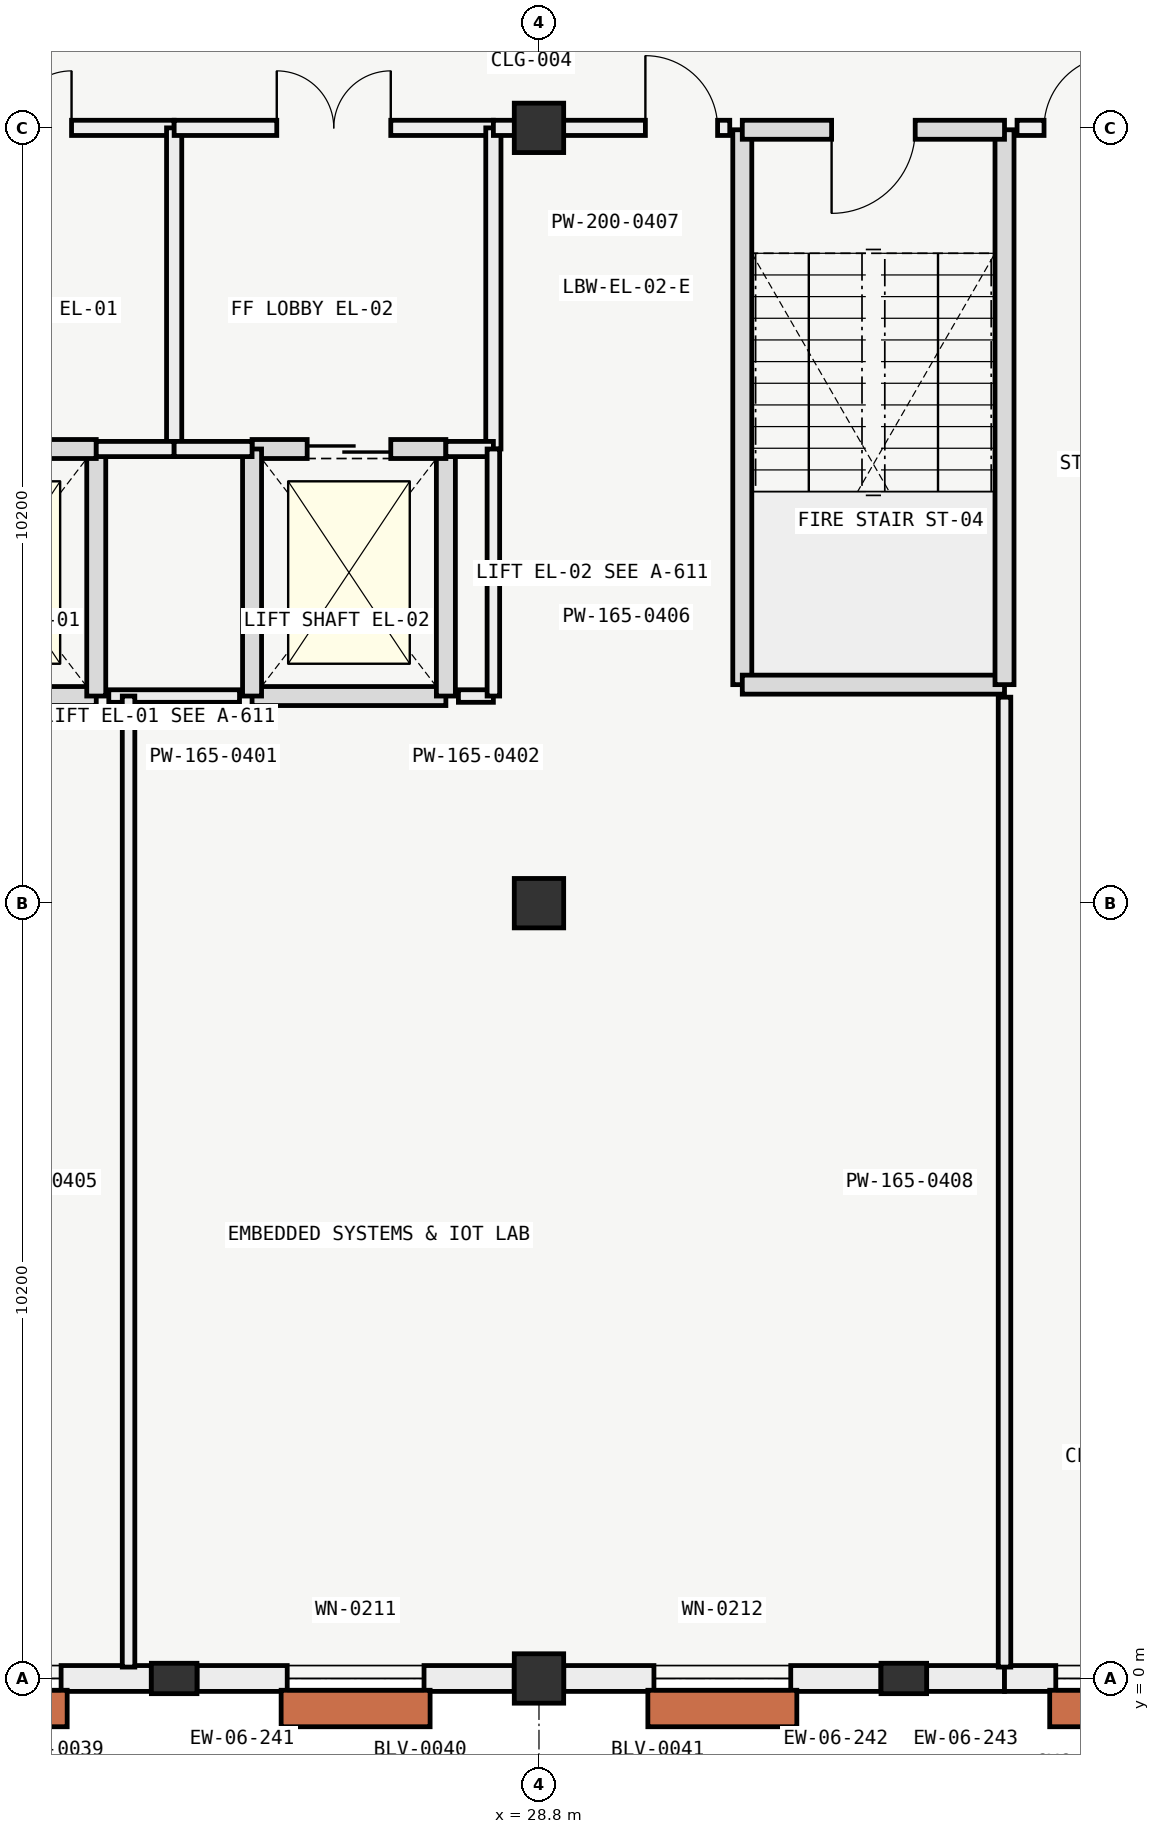
"""IFC4 building model, lengths in metres.
Left out: names, types, materials, properties, quantities, classifications, styles, units other than length and angle.
Written with IfcOpenShell. Run it as: python <this file> out.ifc"""

import sys

from ifc_helpers import new_model, si_unit, direction, frame, frame_2d, origin, origin_2d, place, context, subcontext, project, spatial, rectangle, extrude, element, fill, save


model = new_model("IFC4")
c1 = context("Model", 3, precision=1e-05, world=origin(), true_north=direction((0.0, 1.0)))
c2 = subcontext(c1, "Body", "Model", "MODEL_VIEW")
j1 = project(units=[si_unit("LENGTHUNIT", "METRE"), si_unit("PLANEANGLEUNIT", "RADIAN")], contexts=[c1])
p1 = place(None, origin())
s1 = spatial("IfcSite", under=j1, at=p1, CompositionType="ELEMENT")
p2 = place(p1, origin())
s2 = spatial("IfcBuilding", under=s1, at=p2, CompositionType="ELEMENT")
p3 = place(p2, frame((0.0, 0.0, 13.8)))
s3 = spatial("IfcBuildingStorey", under=s2, at=p3, CompositionType="ELEMENT", Elevation=13.8)
for number, where, z_axis, x_axis in (
    (1, (28.8, 0.0, 0.0), (0.0, 0.0, 1.0), (1.0, 0.0, 0.0)),
    (2, (28.8, 10.2, 0.0), (0.0, 0.0, 1.0), (1.0, 0.0, 0.0)),
    (3, (28.8, 20.4, 0.0), (0.0, 0.0, 1.0), (1.0, 0.0, 0.0)),
):
    element("IfcColumn", number, at=place(p3, frame(where, z_axis=z_axis, x_axis=x_axis)), inside=s3, PredefinedType="COLUMN", context=c2, shape_type="SweptSolid", body=[
        extrude(rectangle(XDim=0.65, YDim=0.65, at=origin_2d()), origin(), (0.0, 0.0, 1.0), 4.2),
    ])
for number, where, z_axis, x_axis in (
    (4, (24.0, 0.0, 0.0), (0.0, 0.0, 1.0), (0.0, 1.0, 0.0)),
    (5, (33.6, 0.0, 0.0), (0.0, 0.0, 1.0), (0.0, 1.0, 0.0)),
):
    element("IfcColumn", number, at=place(p3, frame(where, z_axis=z_axis, x_axis=x_axis)), inside=s3, PredefinedType="PILASTER", context=c2, shape_type="SweptSolid", body=[
        extrude(rectangle(XDim=0.4, YDim=0.6, at=origin_2d()), origin(), (0.0, 0.0, 1.0), 4.2),
    ])
p4 = place(p3, frame((23.699, 0.0, 0.0), z_axis=(0.0, 0.0, 1.0), x_axis=(-1.0, 0.0, 0.0)))
e6 = element("IfcWall", 6, at=p4, inside=s3, PredefinedType="SOLIDWALL", context=c2, shape_type="SweptSolid", body=[
    extrude(rectangle(XDim=4.173, YDim=0.34, at=frame_2d((2.086, 0.0))), origin(), (0.0, 0.0, 1.0), 3.28),
])
p5 = place(p4, frame((1.187, 0.0, 0.8)))
e7 = element("IfcOpeningElement", 7, at=p5, cuts=e6, PredefinedType="OPENING", context=c2, shape_type="SweptSolid", body=[
    extrude(rectangle(XDim=1.8, YDim=2.1, at=frame_2d((0.9, 1.05))), frame((0.0, 0.18, 0.0), z_axis=(0.0, -1.0, 0.0), x_axis=(1.0, 0.0, 0.0)), (0.0, 0.0, 1.0), 0.36),
])
p6 = place(p3, frame((28.474, 0.0, 0.0), z_axis=(0.0, 0.0, 1.0), x_axis=(-1.0, 0.0, 0.0)))
e8 = element("IfcWall", 8, at=p6, inside=s3, PredefinedType="SOLIDWALL", context=c2, shape_type="SweptSolid", body=[
    extrude(rectangle(XDim=4.173, YDim=0.34, at=frame_2d((2.086, 0.0))), origin(), (0.0, 0.0, 1.0), 3.28),
])
p7 = place(p6, frame((1.187, 0.0, 0.8)))
e9 = element("IfcOpeningElement", 9, at=p7, cuts=e8, PredefinedType="OPENING", context=c2, shape_type="SweptSolid", body=[
    extrude(rectangle(XDim=1.8, YDim=2.1, at=frame_2d((0.9, 1.05))), frame((0.0, 0.18, 0.0), z_axis=(0.0, -1.0, 0.0), x_axis=(1.0, 0.0, 0.0)), (0.0, 0.0, 1.0), 0.36),
])
p8 = place(p3, frame((33.299, 0.0, 0.0), z_axis=(0.0, 0.0, 1.0), x_axis=(-1.0, 0.0, 0.0)))
e10 = element("IfcWall", 10, at=p8, inside=s3, PredefinedType="SOLIDWALL", context=c2, shape_type="SweptSolid", body=[
    extrude(rectangle(XDim=4.173, YDim=0.34, at=frame_2d((2.086, 0.0))), origin(), (0.0, 0.0, 1.0), 3.28),
])
p9 = place(p8, frame((1.187, 0.0, 0.8)))
e11 = element("IfcOpeningElement", 11, at=p9, cuts=e10, PredefinedType="OPENING", context=c2, shape_type="SweptSolid", body=[
    extrude(rectangle(XDim=1.8, YDim=2.1, at=frame_2d((0.9, 1.05))), frame((0.0, 0.18, 0.0), z_axis=(0.0, -1.0, 0.0), x_axis=(1.0, 0.0, 0.0)), (0.0, 0.0, 1.0), 0.36),
])
p10 = place(p3, frame((34.925, 0.0, 0.0), z_axis=(0.0, 0.0, 1.0), x_axis=(-1.0, 0.0, 0.0)))
e12 = element("IfcWall", 12, at=p10, inside=s3, PredefinedType="SOLIDWALL", context=c2, shape_type="SweptSolid", body=[
    extrude(rectangle(XDim=1.024, YDim=0.34, at=frame_2d((0.512, 0.0))), origin(), (0.0, 0.0, 1.0), 3.28),
])
p11 = place(p3, frame((38.074, 0.0, 0.0), z_axis=(0.0, 0.0, 1.0), x_axis=(-1.0, 0.0, 0.0)))
e13 = element("IfcWall", 13, at=p11, inside=s3, PredefinedType="SOLIDWALL", context=c2, shape_type="SweptSolid", body=[
    extrude(rectangle(XDim=3.149, YDim=0.34, at=frame_2d((1.574, 0.0))), origin(), (0.0, 0.0, 1.0), 3.28),
])
p12 = place(p11, frame((0.675, 0.0, 0.8)))
e14 = element("IfcOpeningElement", 14, at=p12, cuts=e13, PredefinedType="OPENING", context=c2, shape_type="SweptSolid", body=[
    extrude(rectangle(XDim=1.8, YDim=2.1, at=frame_2d((0.9, 1.05))), frame((0.0, 0.18, 0.0), z_axis=(0.0, -1.0, 0.0), x_axis=(1.0, 0.0, 0.0)), (0.0, 0.0, 1.0), 0.36),
])
p13 = place(p3, frame((31.475, 20.375, 0.0), z_axis=(0.0, 0.0, 1.0), x_axis=(0.0, -1.0, 0.0)))
e15 = element("IfcWall", 15, at=p13, inside=s3, PredefinedType="SOLIDWALL", context=c2, shape_type="SweptSolid", body=[
    extrude(rectangle(XDim=7.3, YDim=0.25, at=frame_2d((3.65, 0.0))), origin(), (0.0, 0.0, 1.0), 3.95),
])
p14 = place(p3, frame((31.475, 13.075, 0.0), z_axis=(0.0, 0.0, 1.0), x_axis=(1.0, 0.0, 0.0)))
e16 = element("IfcWall", 16, at=p14, inside=s3, PredefinedType="SOLIDWALL", context=c2, shape_type="SweptSolid", body=[
    extrude(rectangle(XDim=3.45, YDim=0.25, at=frame_2d((1.725, 0.0))), origin(), (0.0, 0.0, 1.0), 3.95),
])
p15 = place(p3, frame((34.925, 13.075, 0.0), z_axis=(0.0, 0.0, 1.0), x_axis=(0.0, 1.0, 0.0)))
e17 = element("IfcWall", 17, at=p15, inside=s3, PredefinedType="SOLIDWALL", context=c2, shape_type="SweptSolid", body=[
    extrude(rectangle(XDim=7.3, YDim=0.25, at=frame_2d((3.65, 0.0))), origin(), (0.0, 0.0, 1.0), 3.95),
])
p16 = place(p3, frame((34.925, 20.375, 0.0), z_axis=(0.0, 0.0, 1.0), x_axis=(-1.0, 0.0, 0.0)))
e18 = element("IfcWall", 18, at=p16, inside=s3, PredefinedType="SOLIDWALL", context=c2, shape_type="SweptSolid", body=[
    extrude(rectangle(XDim=3.45, YDim=0.25, at=frame_2d((1.725, 0.0))), origin(), (0.0, 0.0, 1.0), 3.95),
])
p17 = place(p16, frame((1.175, 0.0, 0.0)))
e19 = element("IfcOpeningElement", 19, at=p17, cuts=e18, PredefinedType="OPENING", context=c2, shape_type="SweptSolid", body=[
    extrude(rectangle(XDim=1.1, YDim=2.2, at=frame_2d((0.55, 1.1))), frame((0.0, 0.135, 0.0), z_axis=(0.0, -1.0, 0.0), x_axis=(1.0, 0.0, 0.0)), (0.0, 0.0, 1.0), 0.27),
])
p18 = place(p3, frame((20.425, 12.925, 0.0), z_axis=(0.0, 0.0, 1.0), x_axis=(1.0, 0.0, 0.0)))
e20 = element("IfcWall", 20, at=p18, inside=s3, PredefinedType="SOLIDWALL", context=c2, shape_type="SweptSolid", body=[
    extrude(rectangle(XDim=2.55, YDim=0.25, at=frame_2d((1.275, 0.0))), origin(), (0.0, 0.0, 1.0), 3.95),
])
p19 = place(p3, frame((22.975, 12.925, 0.0), z_axis=(0.0, 0.0, 1.0), x_axis=(0.0, 1.0, 0.0)))
e21 = element("IfcWall", 21, at=p19, inside=s3, PredefinedType="SOLIDWALL", context=c2, shape_type="SweptSolid", body=[
    extrude(rectangle(XDim=3.25, YDim=0.25, at=frame_2d((1.625, 0.0))), origin(), (0.0, 0.0, 1.0), 3.95),
])
p20 = place(p3, frame((22.975, 16.175, 0.0), z_axis=(0.0, 0.0, 1.0), x_axis=(-1.0, 0.0, 0.0)))
e22 = element("IfcWall", 22, at=p20, inside=s3, PredefinedType="SOLIDWALL", context=c2, shape_type="SweptSolid", body=[
    extrude(rectangle(XDim=2.55, YDim=0.25, at=frame_2d((1.275, 0.0))), origin(), (0.0, 0.0, 1.0), 3.95),
])
p21 = place(p20, frame((0.725, 0.0, 0.0)))
e23 = element("IfcOpeningElement", 23, at=p21, cuts=e22, PredefinedType="OPENING", context=c2, shape_type="SweptSolid", body=[
    extrude(rectangle(XDim=1.1, YDim=2.1, at=frame_2d((0.55, 1.05))), frame((0.0, 0.135, 0.0), z_axis=(0.0, -1.0, 0.0), x_axis=(1.0, 0.0, 0.0)), (0.0, 0.0, 1.0), 0.27),
])
p22 = place(p3, frame((19.8, 20.4, 0.0), z_axis=(0.0, 0.0, 1.0), x_axis=(1.0, 0.0, 0.0)))
e24 = element("IfcWall", 24, at=p22, inside=s3, PredefinedType="PARTITIONING", context=c2, shape_type="SweptSolid", body=[
    extrude(rectangle(XDim=4.2, YDim=0.2, at=frame_2d((2.1, 0.0))), origin(), (0.0, 0.0, 1.0), 3.33),
])
p23 = place(p22, frame((1.35, 0.0, 0.0)))
e25 = element("IfcOpeningElement", 25, at=p23, cuts=e24, PredefinedType="OPENING", context=c2, shape_type="SweptSolid", body=[
    extrude(rectangle(XDim=1.5, YDim=2.2, at=frame_2d((0.75, 1.1))), frame((0.0, 0.11, 0.0), z_axis=(0.0, -1.0, 0.0), x_axis=(1.0, 0.0, 0.0)), (0.0, 0.0, 1.0), 0.22),
])
p24 = place(p3, frame((24.0, 16.175, 0.0), z_axis=(0.0, 0.0, 1.0), x_axis=(0.0, 1.0, 0.0)))
e26 = element("IfcWall", 26, at=p24, inside=s3, PredefinedType="PARTITIONING", context=c2, shape_type="SweptSolid", body=[
    extrude(rectangle(XDim=4.225, YDim=0.2, at=frame_2d((2.112, 0.0))), origin(), (0.0, 0.0, 1.0), 3.33),
])
p25 = place(p3, frame((22.975, 16.175, 0.0), z_axis=(0.0, 0.0, 1.0), x_axis=(1.0, 0.0, 0.0)))
e27 = element("IfcWall", 27, at=p25, inside=s3, PredefinedType="PARTITIONING", context=c2, shape_type="SweptSolid", body=[
    extrude(rectangle(XDim=1.025, YDim=0.2, at=frame_2d((0.512, 0.0))), origin(), (0.0, 0.0, 1.0), 3.55),
])
p26 = place(p3, frame((25.025, 12.925, 0.0), z_axis=(0.0, 0.0, 1.0), x_axis=(1.0, 0.0, 0.0)))
e28 = element("IfcWall", 28, at=p26, inside=s3, PredefinedType="SOLIDWALL", context=c2, shape_type="SweptSolid", body=[
    extrude(rectangle(XDim=2.55, YDim=0.25, at=frame_2d((1.275, 0.0))), origin(), (0.0, 0.0, 1.0), 3.95),
])
p27 = place(p3, frame((27.575, 12.925, 0.0), z_axis=(0.0, 0.0, 1.0), x_axis=(0.0, 1.0, 0.0)))
e29 = element("IfcWall", 29, at=p27, inside=s3, PredefinedType="SOLIDWALL", context=c2, shape_type="SweptSolid", body=[
    extrude(rectangle(XDim=3.25, YDim=0.25, at=frame_2d((1.625, 0.0))), origin(), (0.0, 0.0, 1.0), 3.95),
])
p28 = place(p3, frame((27.575, 16.175, 0.0), z_axis=(0.0, 0.0, 1.0), x_axis=(-1.0, 0.0, 0.0)))
e30 = element("IfcWall", 30, at=p28, inside=s3, PredefinedType="SOLIDWALL", context=c2, shape_type="SweptSolid", body=[
    extrude(rectangle(XDim=2.55, YDim=0.25, at=frame_2d((1.275, 0.0))), origin(), (0.0, 0.0, 1.0), 3.95),
])
p29 = place(p28, frame((0.725, 0.0, 0.0)))
e31 = element("IfcOpeningElement", 31, at=p29, cuts=e30, PredefinedType="OPENING", context=c2, shape_type="SweptSolid", body=[
    extrude(rectangle(XDim=1.1, YDim=2.1, at=frame_2d((0.55, 1.05))), frame((0.0, 0.135, 0.0), z_axis=(0.0, -1.0, 0.0), x_axis=(1.0, 0.0, 0.0)), (0.0, 0.0, 1.0), 0.27),
])
p30 = place(p3, frame((25.025, 16.175, 0.0), z_axis=(0.0, 0.0, 1.0), x_axis=(0.0, -1.0, 0.0)))
e32 = element("IfcWall", 32, at=p30, inside=s3, PredefinedType="SOLIDWALL", context=c2, shape_type="SweptSolid", body=[
    extrude(rectangle(XDim=3.25, YDim=0.25, at=frame_2d((1.625, 0.0))), origin(), (0.0, 0.0, 1.0), 3.95),
])
p31 = place(p3, frame((24.0, 20.4, 0.0), z_axis=(0.0, 0.0, 1.0), x_axis=(1.0, 0.0, 0.0)))
e33 = element("IfcWall", 33, at=p31, inside=s3, PredefinedType="PARTITIONING", context=c2, shape_type="SweptSolid", body=[
    extrude(rectangle(XDim=4.2, YDim=0.2, at=frame_2d((2.1, 0.0))), origin(), (0.0, 0.0, 1.0), 3.33),
])
p32 = place(p31, frame((1.35, 0.0, 0.0)))
e34 = element("IfcOpeningElement", 34, at=p32, cuts=e33, PredefinedType="OPENING", context=c2, shape_type="SweptSolid", body=[
    extrude(rectangle(XDim=1.5, YDim=2.2, at=frame_2d((0.75, 1.1))), frame((0.0, 0.11, 0.0), z_axis=(0.0, -1.0, 0.0), x_axis=(1.0, 0.0, 0.0)), (0.0, 0.0, 1.0), 0.22),
])
p33 = place(p3, frame((28.2, 16.175, 0.0), z_axis=(0.0, 0.0, 1.0), x_axis=(0.0, 1.0, 0.0)))
e35 = element("IfcWall", 35, at=p33, inside=s3, PredefinedType="PARTITIONING", context=c2, shape_type="SweptSolid", body=[
    extrude(rectangle(XDim=4.225, YDim=0.2, at=frame_2d((2.112, 0.0))), origin(), (0.0, 0.0, 1.0), 3.33),
])
p34 = place(p3, frame((24.0, 16.175, 0.0), z_axis=(0.0, 0.0, 1.0), x_axis=(1.0, 0.0, 0.0)))
e36 = element("IfcWall", 36, at=p34, inside=s3, PredefinedType="PARTITIONING", context=c2, shape_type="SweptSolid", body=[
    extrude(rectangle(XDim=1.025, YDim=0.2, at=frame_2d((0.512, 0.0))), origin(), (0.0, 0.0, 1.0), 3.55),
])
p35 = place(p3, frame((27.575, 16.175, 0.0), z_axis=(0.0, 0.0, 1.0), x_axis=(1.0, 0.0, 0.0)))
e37 = element("IfcWall", 37, at=p35, inside=s3, PredefinedType="PARTITIONING", context=c2, shape_type="SweptSolid", body=[
    extrude(rectangle(XDim=0.625, YDim=0.2, at=frame_2d((0.312, 0.0))), origin(), (0.0, 0.0, 1.0), 3.55),
])
p36 = place(p3, frame((23.14, 12.925, 0.0), z_axis=(0.0, 0.0, 1.0), x_axis=(1.0, 0.0, 0.0)))
e38 = element("IfcWall", 38, at=p36, inside=s3, PredefinedType="PARTITIONING", context=c2, shape_type="SweptSolid", body=[
    extrude(rectangle(XDim=1.72, YDim=0.165, at=frame_2d((0.86, 0.0))), origin(), (0.0, 0.0, 1.0), 3.85),
])
p37 = place(p3, frame((27.74, 12.925, 0.0), z_axis=(0.0, 0.0, 1.0), x_axis=(1.0, 0.0, 0.0)))
e39 = element("IfcWall", 39, at=p37, inside=s3, PredefinedType="PARTITIONING", context=c2, shape_type="SweptSolid", body=[
    extrude(rectangle(XDim=0.46, YDim=0.165, at=frame_2d((0.23, 0.0))), origin(), (0.0, 0.0, 1.0), 3.85),
])
p38 = place(p3, frame((23.4, 0.15, 0.0), z_axis=(0.0, 0.0, 1.0), x_axis=(0.0, 1.0, 0.0)))
e40 = element("IfcWall", 40, at=p38, inside=s3, PredefinedType="PARTITIONING", context=c2, shape_type="SweptSolid", body=[
    extrude(rectangle(XDim=12.775, YDim=0.165, at=frame_2d((6.388, 0.0))), origin(), (0.0, 0.0, 1.0), 3.33),
])
p39 = place(p3, frame((28.2, 12.925, 0.0), z_axis=(0.0, 0.0, 1.0), x_axis=(0.0, 1.0, 0.0)))
e41 = element("IfcWall", 41, at=p39, inside=s3, PredefinedType="PARTITIONING", context=c2, shape_type="SweptSolid", body=[
    extrude(rectangle(XDim=3.25, YDim=0.165, at=frame_2d((1.625, 0.0))), origin(), (0.0, 0.0, 1.0), 3.85),
])
p40 = place(p3, frame((28.2, 20.4, 0.0), z_axis=(0.0, 0.0, 1.0), x_axis=(1.0, 0.0, 0.0)))
e42 = element("IfcWall", 42, at=p40, inside=s3, PredefinedType="PARTITIONING", context=c2, shape_type="SweptSolid", body=[
    extrude(rectangle(XDim=3.11, YDim=0.2, at=frame_2d((1.555, 0.0))), origin(), (0.0, 0.0, 1.0), 3.28),
])
p41 = place(p40, frame((2.0, 0.0, 0.0)))
e43 = element("IfcOpeningElement", 43, at=p41, cuts=e42, PredefinedType="OPENING", context=c2, shape_type="SweptSolid", body=[
    extrude(rectangle(XDim=0.95, YDim=2.1, at=frame_2d((0.475, 1.05))), frame((0.0, 0.11, 0.0), z_axis=(0.0, -1.0, 0.0), x_axis=(1.0, 0.0, 0.0)), (0.0, 0.0, 1.0), 0.22),
])
p42 = place(p3, frame((34.925, 0.15, 0.0), z_axis=(0.0, 0.0, 1.0), x_axis=(0.0, 1.0, 0.0)))
e44 = element("IfcWall", 44, at=p42, inside=s3, PredefinedType="PARTITIONING", context=c2, shape_type="SweptSolid", body=[
    extrude(rectangle(XDim=12.76, YDim=0.165, at=frame_2d((6.38, 0.0))), origin(), (0.0, 0.0, 1.0), 3.33),
])
p43 = place(p3, frame((35.09, 20.4, 0.0), z_axis=(0.0, 0.0, 1.0), x_axis=(1.0, 0.0, 0.0)))
e45 = element("IfcWall", 45, at=p43, inside=s3, PredefinedType="PARTITIONING", context=c2, shape_type="SweptSolid", body=[
    extrude(rectangle(XDim=12.76, YDim=0.2, at=frame_2d((6.38, 0.0))), origin(), (0.0, 0.0, 1.0), 3.28),
])
p44 = place(p43, frame((0.355, 0.0, 0.0)))
e46 = element("IfcOpeningElement", 46, at=p44, cuts=e45, PredefinedType="OPENING", context=c2, shape_type="SweptSolid", body=[
    extrude(rectangle(XDim=0.95, YDim=2.1, at=frame_2d((0.475, 1.05))), frame((0.0, 0.11, 0.0), z_axis=(0.0, -1.0, 0.0), x_axis=(1.0, 0.0, 0.0)), (0.0, 0.0, 1.0), 0.22),
])
p45 = place(p43, frame((10.66, 0.0, 0.0)))
e47 = element("IfcOpeningElement", 47, at=p45, cuts=e45, PredefinedType="OPENING", context=c2, shape_type="SweptSolid", body=[
    extrude(rectangle(XDim=0.95, YDim=2.1, at=frame_2d((0.475, 1.05))), frame((0.0, 0.11, 0.0), z_axis=(0.0, -1.0, 0.0), x_axis=(1.0, 0.0, 0.0)), (0.0, 0.0, 1.0), 0.22),
])
p46 = place(p5, origin())
e48 = element("IfcWindow", 48, at=p46, inside=s3, PartitioningType="SINGLE_PANEL", PredefinedType="WINDOW", context=c2, shape_type="SweptSolid", body=[
    extrude(rectangle(XDim=1.8, YDim=2.1, at=frame_2d((0.9, 1.05))), frame((0.0, 0.03, 0.0), z_axis=(0.0, -1.0, 0.0), x_axis=(1.0, 0.0, 0.0)), (0.0, 0.0, 1.0), 0.06),
])
fill(e7, e48)
p47 = place(p7, origin())
e49 = element("IfcWindow", 49, at=p47, inside=s3, PartitioningType="SINGLE_PANEL", PredefinedType="WINDOW", context=c2, shape_type="SweptSolid", body=[
    extrude(rectangle(XDim=1.8, YDim=2.1, at=frame_2d((0.9, 1.05))), frame((0.0, 0.03, 0.0), z_axis=(0.0, -1.0, 0.0), x_axis=(1.0, 0.0, 0.0)), (0.0, 0.0, 1.0), 0.06),
])
fill(e9, e49)
p48 = place(p9, origin())
e50 = element("IfcWindow", 50, at=p48, inside=s3, PartitioningType="SINGLE_PANEL", PredefinedType="WINDOW", context=c2, shape_type="SweptSolid", body=[
    extrude(rectangle(XDim=1.8, YDim=2.1, at=frame_2d((0.9, 1.05))), frame((0.0, 0.03, 0.0), z_axis=(0.0, -1.0, 0.0), x_axis=(1.0, 0.0, 0.0)), (0.0, 0.0, 1.0), 0.06),
])
fill(e11, e50)
p49 = place(p12, origin())
e51 = element("IfcWindow", 51, at=p49, inside=s3, PartitioningType="SINGLE_PANEL", PredefinedType="WINDOW", context=c2, shape_type="SweptSolid", body=[
    extrude(rectangle(XDim=1.8, YDim=2.1, at=frame_2d((0.9, 1.05))), frame((0.0, 0.03, 0.0), z_axis=(0.0, -1.0, 0.0), x_axis=(1.0, 0.0, 0.0)), (0.0, 0.0, 1.0), 0.06),
])
fill(e14, e51)
p50 = place(p17, origin())
e52 = element("IfcDoor", 52, at=p50, inside=s3, OperationType="SINGLE_SWING_RIGHT", PredefinedType="DOOR", context=c2, shape_type="SweptSolid", body=[
    extrude(rectangle(XDim=1.1, YDim=2.2, at=frame_2d((0.55, 1.1))), frame((0.0, 0.025, 0.0), z_axis=(0.0, -1.0, 0.0), x_axis=(1.0, 0.0, 0.0)), (0.0, 0.0, 1.0), 0.05),
])
fill(e19, e52)
p51 = place(p23, origin())
e53 = element("IfcDoor", 53, at=p51, inside=s3, OperationType="SINGLE_SWING_LEFT", PredefinedType="DOOR", context=c2, shape_type="SweptSolid", body=[
    extrude(rectangle(XDim=1.5, YDim=2.2, at=frame_2d((0.75, 1.1))), frame((0.0, 0.025, 0.0), z_axis=(0.0, -1.0, 0.0), x_axis=(1.0, 0.0, 0.0)), (0.0, 0.0, 1.0), 0.05),
])
fill(e25, e53)
p52 = place(p29, origin())
e54 = element("IfcDoor", 54, at=p52, inside=s3, OperationType="SLIDING_TO_LEFT", PredefinedType="DOOR", context=c2, shape_type="SweptSolid", body=[
    extrude(rectangle(XDim=1.1, YDim=2.1, at=frame_2d((0.55, 1.05))), frame((0.0, 0.025, 0.0), z_axis=(0.0, -1.0, 0.0), x_axis=(1.0, 0.0, 0.0)), (0.0, 0.0, 1.0), 0.05),
])
fill(e31, e54)
p53 = place(p32, origin())
e55 = element("IfcDoor", 55, at=p53, inside=s3, OperationType="SINGLE_SWING_LEFT", PredefinedType="DOOR", context=c2, shape_type="SweptSolid", body=[
    extrude(rectangle(XDim=1.5, YDim=2.2, at=frame_2d((0.75, 1.1))), frame((0.0, 0.025, 0.0), z_axis=(0.0, -1.0, 0.0), x_axis=(1.0, 0.0, 0.0)), (0.0, 0.0, 1.0), 0.05),
])
fill(e34, e55)
p54 = place(p41, origin())
e56 = element("IfcDoor", 56, at=p54, inside=s3, OperationType="SINGLE_SWING_LEFT", PredefinedType="DOOR", context=c2, shape_type="SweptSolid", body=[
    extrude(rectangle(XDim=0.95, YDim=2.1, at=frame_2d((0.475, 1.05))), frame((0.0, 0.025, 0.0), z_axis=(0.0, -1.0, 0.0), x_axis=(1.0, 0.0, 0.0)), (0.0, 0.0, 1.0), 0.05),
])
fill(e43, e56)
p55 = place(p44, origin())
e57 = element("IfcDoor", 57, at=p55, inside=s3, OperationType="SINGLE_SWING_RIGHT", PredefinedType="DOOR", context=c2, shape_type="SweptSolid", body=[
    extrude(rectangle(XDim=0.95, YDim=2.1, at=frame_2d((0.475, 1.05))), frame((0.0, 0.025, 0.0), z_axis=(0.0, -1.0, 0.0), x_axis=(1.0, 0.0, 0.0)), (0.0, 0.0, 1.0), 0.05),
])
fill(e46, e57)
save(model, sys.argv[1])
